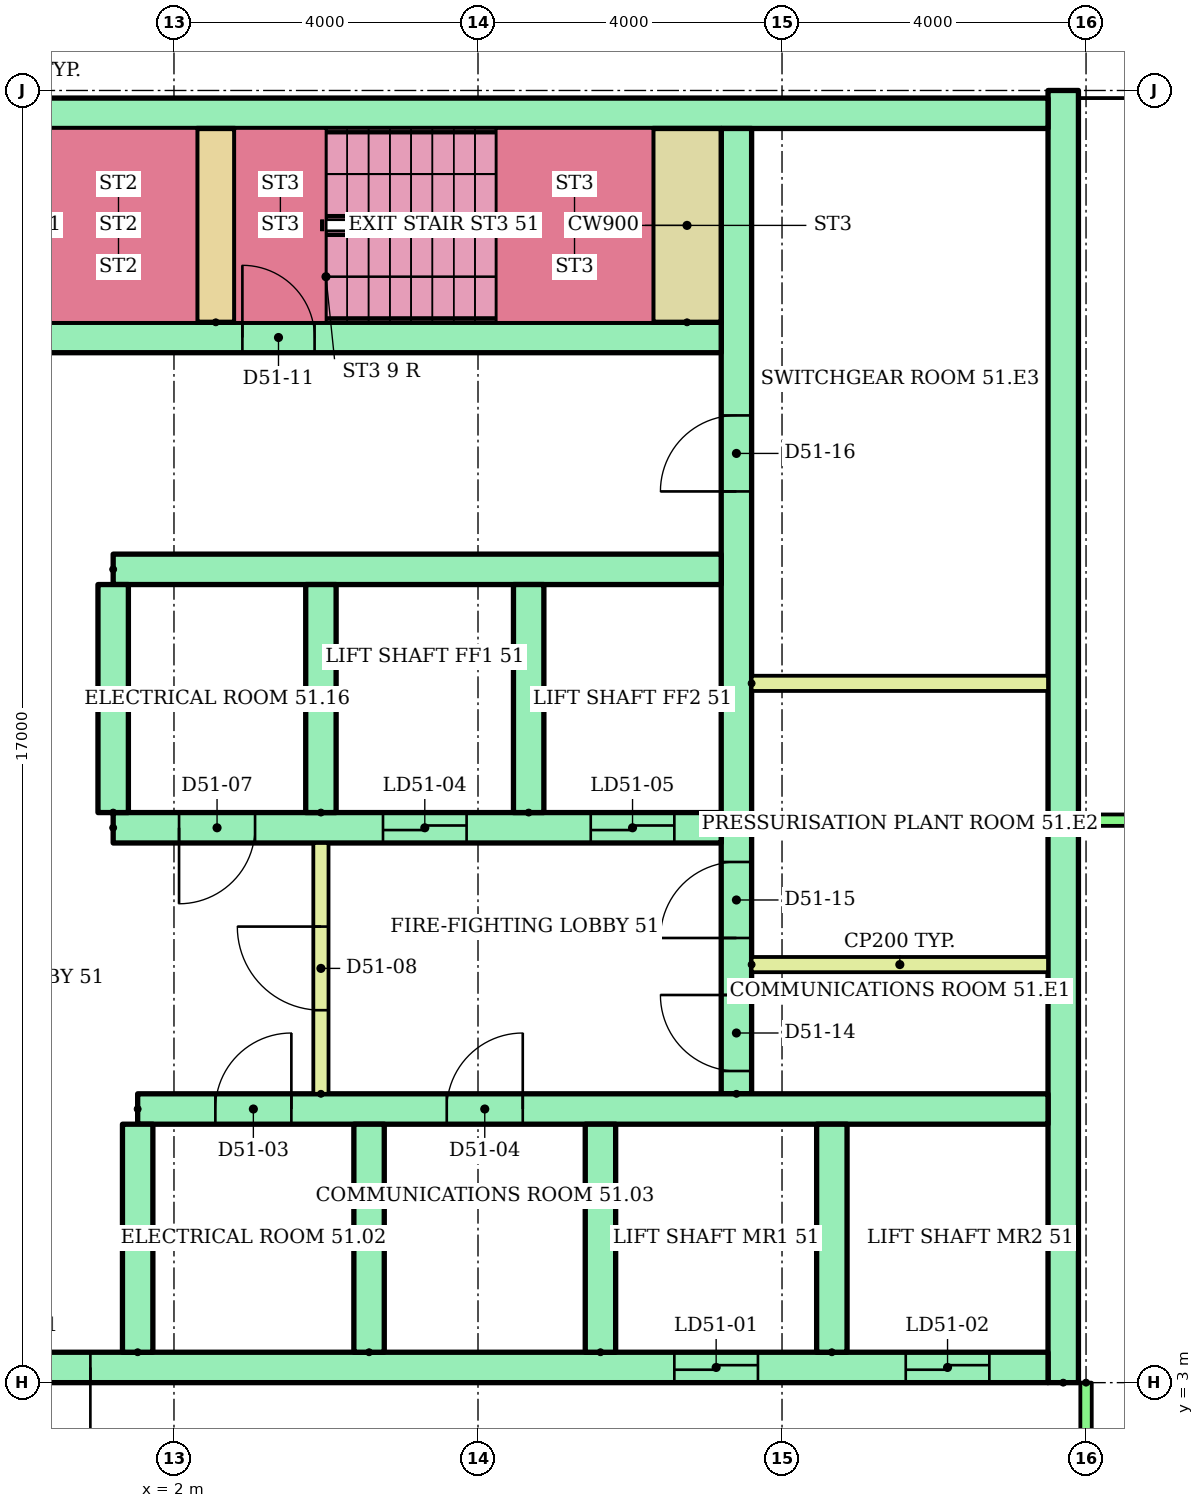
"""IFC4 building model, lengths in metres.
Left out: names, types, materials, properties, quantities, classifications, styles, units other than length and angle.
Written with IfcOpenShell. Run it as: python <this file> out.ifc"""

import sys

from ifc_helpers import new_model, si_unit, direction, frame, frame_2d, origin, place, context, subcontext, project, spatial, rectangle, extrude, element, fill, save


model = new_model("IFC4")
c1 = context("Model", 3, precision=1e-05, world=origin(), true_north=direction((0.0, 1.0)))
c2 = subcontext(c1, "Body", "Model", "MODEL_VIEW")
j1 = project(units=[si_unit("LENGTHUNIT", "METRE"), si_unit("PLANEANGLEUNIT", "RADIAN")], contexts=[c1])
p1 = place(None, origin())
s1 = spatial("IfcSite", under=j1, at=p1, CompositionType="ELEMENT")
p2 = place(p1, origin())
s2 = spatial("IfcBuilding", under=s1, at=p2, CompositionType="ELEMENT")
p3 = place(p2, frame((0.0, 0.0, 194.1)))
s3 = spatial("IfcBuildingStorey", under=s2, at=p3, CompositionType="ELEMENT", Elevation=194.1)
p4 = place(p3, frame((13.7, 3.0, 0.0), z_axis=(0.0, 0.0, 1.0), x_axis=(0.0, 1.0, 0.0)))
e1 = element("IfcWall", 1, at=p4, inside=s3, PredefinedType="SHEAR", context=c2, shape_type="SweptSolid", body=[
    extrude(rectangle(XDim=17.0, YDim=0.4, at=frame_2d((8.5, 0.0))), origin(), (0.0, 0.0, 1.0), 8.8),
])
p5 = place(p3, frame((-13.5, 19.7, 0.0)))
e2 = element("IfcWall", 2, at=p5, inside=s3, PredefinedType="SHEAR", context=c2, shape_type="SweptSolid", body=[
    extrude(rectangle(XDim=27.0, YDim=0.4, at=frame_2d((13.5, 0.0))), origin(), (0.0, 0.0, 1.0), 8.8),
])
p6 = place(p3, frame((9.4, 6.8, 0.0), z_axis=(0.0, 0.0, 1.0), x_axis=(0.0, 1.0, 0.0)))
e3 = element("IfcWall", 3, at=p6, inside=s3, PredefinedType="SHEAR", context=c2, shape_type="SweptSolid", body=[
    extrude(rectangle(XDim=12.7, YDim=0.4, at=frame_2d((6.35, 0.0))), origin(), (0.0, 0.0, 1.0), 8.8),
])
p7 = place(p6, frame((0.3, 0.0, 0.0)))
e4 = element("IfcOpeningElement", 4, at=p7, cuts=e3, PredefinedType="OPENING", context=c2, shape_type="SweptSolid", body=[
    extrude(rectangle(XDim=1.0, YDim=2.1, at=frame_2d((0.5, 1.05))), frame((0.0, 0.21, 0.0), z_axis=(0.0, -1.0, 0.0), x_axis=(1.0, 0.0, 0.0)), (0.0, 0.0, 1.0), 0.42),
])
p8 = place(p6, frame((2.05, 0.0, 0.0)))
e5 = element("IfcOpeningElement", 5, at=p8, cuts=e3, PredefinedType="OPENING", context=c2, shape_type="SweptSolid", body=[
    extrude(rectangle(XDim=1.0, YDim=2.1, at=frame_2d((0.5, 1.05))), frame((0.0, 0.21, 0.0), z_axis=(0.0, -1.0, 0.0), x_axis=(1.0, 0.0, 0.0)), (0.0, 0.0, 1.0), 0.42),
])
p9 = place(p6, frame((7.925, 0.0, 0.0)))
e6 = element("IfcOpeningElement", 6, at=p9, cuts=e3, PredefinedType="OPENING", context=c2, shape_type="SweptSolid", body=[
    extrude(rectangle(XDim=1.0, YDim=2.1, at=frame_2d((0.5, 1.05))), frame((0.0, 0.21, 0.0), z_axis=(0.0, -1.0, 0.0), x_axis=(1.0, 0.0, 0.0)), (0.0, 0.0, 1.0), 0.42),
])
p10 = place(p3, frame((-13.5, 3.2, 0.0)))
e7 = element("IfcWall", 7, at=p10, inside=s3, PredefinedType="SHEAR", context=c2, shape_type="SweptSolid", body=[
    extrude(rectangle(XDim=27.0, YDim=0.4, at=frame_2d((13.5, 0.0))), origin(), (0.0, 0.0, 1.0), 8.8),
])
p11 = place(p10, frame((22.083, 0.0, 0.0)))
e8 = element("IfcOpeningElement", 8, at=p11, cuts=e7, PredefinedType="OPENING", context=c2, shape_type="SweptSolid", body=[
    extrude(rectangle(XDim=1.1, YDim=2.1, at=frame_2d((0.55, 1.05))), frame((0.0, 0.21, 0.0), z_axis=(0.0, -1.0, 0.0), x_axis=(1.0, 0.0, 0.0)), (0.0, 0.0, 1.0), 0.42),
])
p12 = place(p10, frame((25.128, 0.0, 0.0)))
e9 = element("IfcOpeningElement", 9, at=p12, cuts=e7, PredefinedType="OPENING", context=c2, shape_type="SweptSolid", body=[
    extrude(rectangle(XDim=1.1, YDim=2.1, at=frame_2d((0.55, 1.05))), frame((0.0, 0.21, 0.0), z_axis=(0.0, -1.0, 0.0), x_axis=(1.0, 0.0, 0.0)), (0.0, 0.0, 1.0), 0.42),
])
p13 = place(p10, frame((12.6, 0.0, 0.0)))
e10 = element("IfcOpeningElement", 10, at=p13, cuts=e7, PredefinedType="OPENING", context=c2, shape_type="SweptSolid", body=[
    extrude(rectangle(XDim=1.8, YDim=2.1, at=frame_2d((0.9, 1.05))), frame((0.0, 0.21, 0.0), z_axis=(0.0, -1.0, 0.0), x_axis=(1.0, 0.0, 0.0)), (0.0, 0.0, 1.0), 0.42),
])
p14 = place(p3, frame((1.522, 6.6, 0.0)))
e11 = element("IfcWall", 11, at=p14, inside=s3, PredefinedType="SHEAR", context=c2, shape_type="SweptSolid", body=[
    extrude(rectangle(XDim=11.978, YDim=0.4, at=frame_2d((5.989, 0.0))), origin(), (0.0, 0.0, 1.0), 8.8),
])
p15 = place(p14, frame((1.022, 0.0, 0.0)))
e12 = element("IfcOpeningElement", 12, at=p15, cuts=e11, PredefinedType="OPENING", context=c2, shape_type="SweptSolid", body=[
    extrude(rectangle(XDim=1.0, YDim=2.1, at=frame_2d((0.5, 1.05))), frame((0.0, 0.21, 0.0), z_axis=(0.0, -1.0, 0.0), x_axis=(1.0, 0.0, 0.0)), (0.0, 0.0, 1.0), 0.42),
])
p16 = place(p14, frame((4.067, 0.0, 0.0)))
e13 = element("IfcOpeningElement", 13, at=p16, cuts=e11, PredefinedType="OPENING", context=c2, shape_type="SweptSolid", body=[
    extrude(rectangle(XDim=1.0, YDim=2.1, at=frame_2d((0.5, 1.05))), frame((0.0, 0.21, 0.0), z_axis=(0.0, -1.0, 0.0), x_axis=(1.0, 0.0, 0.0)), (0.0, 0.0, 1.0), 0.42),
])
for number, where, z_axis, x_axis in (
    (14, (1.522, 3.4, 0.0), (0.0, 0.0, 1.0), (0.0, 1.0, 0.0)),
    (15, (4.567, 3.4, 0.0), (0.0, 0.0, 1.0), (0.0, 1.0, 0.0)),
    (16, (7.611, 3.4, 0.0), (0.0, 0.0, 1.0), (0.0, 1.0, 0.0)),
    (17, (10.656, 3.4, 0.0), (0.0, 0.0, 1.0), (0.0, 1.0, 0.0)),
):
    element("IfcWall", number, at=place(p3, frame(where, z_axis=z_axis, x_axis=x_axis)), inside=s3, PredefinedType="SHEAR", context=c2, shape_type="SweptSolid", body=[
        extrude(rectangle(XDim=3.0, YDim=0.4, at=frame_2d((1.5, 0.0))), origin(), (0.0, 0.0, 1.0), 8.8),
    ])
p17 = place(p3, frame((1.2, 10.3, 0.0)))
e18 = element("IfcWall", 18, at=p17, inside=s3, PredefinedType="SHEAR", context=c2, shape_type="SweptSolid", body=[
    extrude(rectangle(XDim=8.0, YDim=0.4, at=frame_2d((4.0, 0.0))), origin(), (0.0, 0.0, 1.0), 8.8),
])
p18 = place(p17, frame((3.55, 0.0, 0.0)))
e19 = element("IfcOpeningElement", 19, at=p18, cuts=e18, PredefinedType="OPENING", context=c2, shape_type="SweptSolid", body=[
    extrude(rectangle(XDim=1.1, YDim=2.1, at=frame_2d((0.55, 1.05))), frame((0.0, 0.21, 0.0), z_axis=(0.0, -1.0, 0.0), x_axis=(1.0, 0.0, 0.0)), (0.0, 0.0, 1.0), 0.42),
])
p19 = place(p17, frame((6.283, 0.0, 0.0)))
e20 = element("IfcOpeningElement", 20, at=p19, cuts=e18, PredefinedType="OPENING", context=c2, shape_type="SweptSolid", body=[
    extrude(rectangle(XDim=1.1, YDim=2.1, at=frame_2d((0.55, 1.05))), frame((0.0, 0.21, 0.0), z_axis=(0.0, -1.0, 0.0), x_axis=(1.0, 0.0, 0.0)), (0.0, 0.0, 1.0), 0.42),
])
p20 = place(p17, frame((0.867, 0.0, 0.0)))
e21 = element("IfcOpeningElement", 21, at=p20, cuts=e18, PredefinedType="OPENING", context=c2, shape_type="SweptSolid", body=[
    extrude(rectangle(XDim=1.0, YDim=2.1, at=frame_2d((0.5, 1.05))), frame((0.0, 0.21, 0.0), z_axis=(0.0, -1.0, 0.0), x_axis=(1.0, 0.0, 0.0)), (0.0, 0.0, 1.0), 0.42),
])
p21 = place(p3, frame((1.2, 13.7, 0.0)))
e22 = element("IfcWall", 22, at=p21, inside=s3, PredefinedType="SHEAR", context=c2, shape_type="SweptSolid", body=[
    extrude(rectangle(XDim=8.0, YDim=0.4, at=frame_2d((4.0, 0.0))), origin(), (0.0, 0.0, 1.0), 8.8),
])
for number, where, z_axis, x_axis in (
    (23, (1.2, 10.5, 0.0), (0.0, 0.0, 1.0), (0.0, 1.0, 0.0)),
    (24, (3.933, 10.5, 0.0), (0.0, 0.0, 1.0), (0.0, 1.0, 0.0)),
    (25, (6.667, 10.5, 0.0), (0.0, 0.0, 1.0), (0.0, 1.0, 0.0)),
):
    element("IfcWall", number, at=place(p3, frame(where, z_axis=z_axis, x_axis=x_axis)), inside=s3, PredefinedType="SHEAR", context=c2, shape_type="SweptSolid", body=[
        extrude(rectangle(XDim=3.0, YDim=0.4, at=frame_2d((1.5, 0.0))), origin(), (0.0, 0.0, 1.0), 8.8),
    ])
p22 = place(p3, frame((3.933, 6.8, 0.0), z_axis=(0.0, 0.0, 1.0), x_axis=(0.0, 1.0, 0.0)))
e26 = element("IfcWall", 26, at=p22, inside=s3, PredefinedType="PARTITIONING", context=c2, shape_type="SweptSolid", body=[
    extrude(rectangle(XDim=3.3, YDim=0.2, at=frame_2d((1.65, 0.0))), origin(), (0.0, 0.0, 1.0), 8.8),
])
p23 = place(p22, frame((1.1, 0.0, 0.0)))
e27 = element("IfcOpeningElement", 27, at=p23, cuts=e26, PredefinedType="OPENING", context=c2, shape_type="SweptSolid", body=[
    extrude(rectangle(XDim=1.1, YDim=2.1, at=frame_2d((0.55, 1.05))), frame((0.0, 0.11, 0.0), z_axis=(0.0, -1.0, 0.0), x_axis=(1.0, 0.0, 0.0)), (0.0, 0.0, 1.0), 0.22),
])
p24 = place(p3, frame((-9.2, 16.75, 0.0)))
e28 = element("IfcWall", 28, at=p24, inside=s3, PredefinedType="SHEAR", context=c2, shape_type="SweptSolid", body=[
    extrude(rectangle(XDim=18.4, YDim=0.4, at=frame_2d((9.2, 0.0))), origin(), (0.0, 0.0, 1.0), 8.8),
])
p25 = place(p24, frame((0.1, 0.0, 0.0)))
e29 = element("IfcOpeningElement", 29, at=p25, cuts=e28, PredefinedType="OPENING", context=c2, shape_type="SweptSolid", body=[
    extrude(rectangle(XDim=0.95, YDim=2.1, at=frame_2d((0.475, 1.05))), frame((0.0, 0.21, 0.0), z_axis=(0.0, -1.0, 0.0), x_axis=(1.0, 0.0, 0.0)), (0.0, 0.0, 1.0), 0.42),
])
p26 = place(p24, frame((6.1, 0.0, 0.0)))
e30 = element("IfcOpeningElement", 30, at=p26, cuts=e28, PredefinedType="OPENING", context=c2, shape_type="SweptSolid", body=[
    extrude(rectangle(XDim=0.95, YDim=2.1, at=frame_2d((0.475, 1.05))), frame((0.0, 0.21, 0.0), z_axis=(0.0, -1.0, 0.0), x_axis=(1.0, 0.0, 0.0)), (0.0, 0.0, 1.0), 0.42),
])
p27 = place(p24, frame((12.1, 0.0, 0.0)))
e31 = element("IfcOpeningElement", 31, at=p27, cuts=e28, PredefinedType="OPENING", context=c2, shape_type="SweptSolid", body=[
    extrude(rectangle(XDim=0.95, YDim=2.1, at=frame_2d((0.475, 1.05))), frame((0.0, 0.21, 0.0), z_axis=(0.0, -1.0, 0.0), x_axis=(1.0, 0.0, 0.0)), (0.0, 0.0, 1.0), 0.42),
])
p28 = place(p3, frame((2.55, 16.95, 0.0), z_axis=(0.0, 0.0, 1.0), x_axis=(0.0, 1.0, 0.0)))
e32 = element("IfcWall", 32, at=p28, inside=s3, PredefinedType="SHEAR", context=c2, shape_type="SweptSolid", body=[
    extrude(rectangle(XDim=2.55, YDim=0.5, at=frame_2d((1.275, 0.0))), origin(), (0.0, 0.0, 1.0), 8.8),
])
p29 = place(p3, frame((8.75, 16.95, 0.0), z_axis=(0.0, 0.0, 1.0), x_axis=(0.0, 1.0, 0.0)))
e33 = element("IfcWall", 33, at=p29, inside=s3, PredefinedType="SHEAR", context=c2, shape_type="SweptSolid", body=[
    extrude(rectangle(XDim=2.55, YDim=0.9, at=frame_2d((1.275, 0.0))), origin(), (0.0, 0.0, 1.0), 8.8),
])
for number, where in (
    (34, (9.6, 8.5, 0.0)),
    (35, (9.6, 12.2, 0.0)),
):
    element("IfcWall", number, at=place(p3, frame(where)), inside=s3, PredefinedType="PARTITIONING", context=c2, shape_type="SweptSolid", body=[
        extrude(rectangle(XDim=3.9, YDim=0.2, at=frame_2d((1.95, 0.0))), origin(), (0.0, 0.0, 1.0), 8.8),
    ])
p30 = place(p3, frame((22.0, 10.4, 0.0), z_axis=(0.0, 0.0, 1.0), x_axis=(-1.0, 0.0, 0.0)))
e36 = element("IfcWall", 36, at=p30, inside=s3, PredefinedType="PARTITIONING", context=c2, shape_type="SweptSolid", body=[
    extrude(rectangle(XDim=8.0, YDim=0.15, at=frame_2d((4.0, 0.0))), origin(), (0.0, 0.0, 1.0), 8.8),
])
p31 = place(p3, frame((14.0, 3.0, 0.0), z_axis=(0.0, 0.0, 1.0), x_axis=(0.0, -1.0, 0.0)))
e37 = element("IfcWall", 37, at=p31, inside=s3, PredefinedType="PARTITIONING", context=c2, shape_type="SweptSolid", body=[
    extrude(rectangle(XDim=1.6, YDim=0.15, at=frame_2d((0.8, 0.0))), origin(), (0.0, 0.0, 1.0), 8.8),
])
p32 = place(p11, origin())
e38 = element("IfcDoor", 38, at=p32, inside=s3, OperationType="SLIDING_TO_LEFT", PredefinedType="DOOR", context=c2, shape_type="SweptSolid", body=[
    extrude(rectangle(XDim=1.1, YDim=2.1, at=frame_2d((0.55, 1.05))), frame((0.0, 0.025, 0.0), z_axis=(0.0, -1.0, 0.0), x_axis=(1.0, 0.0, 0.0)), (0.0, 0.0, 1.0), 0.05),
])
fill(e8, e38)
p33 = place(p12, origin())
e39 = element("IfcDoor", 39, at=p33, inside=s3, OperationType="SLIDING_TO_LEFT", PredefinedType="DOOR", context=c2, shape_type="SweptSolid", body=[
    extrude(rectangle(XDim=1.1, YDim=2.1, at=frame_2d((0.55, 1.05))), frame((0.0, 0.025, 0.0), z_axis=(0.0, -1.0, 0.0), x_axis=(1.0, 0.0, 0.0)), (0.0, 0.0, 1.0), 0.05),
])
fill(e9, e39)
p34 = place(p13, frame((1.8, 0.0, 0.0), z_axis=(0.0, 0.0, 1.0), x_axis=(-1.0, 0.0, 0.0)))
e40 = element("IfcDoor", 40, at=p34, inside=s3, OperationType="DOUBLE_DOOR_SINGLE_SWING", PredefinedType="DOOR", context=c2, shape_type="SweptSolid", body=[
    extrude(rectangle(XDim=1.8, YDim=2.1, at=frame_2d((0.9, 1.05))), frame((0.0, 0.025, 0.0), z_axis=(0.0, -1.0, 0.0), x_axis=(1.0, 0.0, 0.0)), (0.0, 0.0, 1.0), 0.05),
])
fill(e10, e40)
p35 = place(p15, origin())
e41 = element("IfcDoor", 41, at=p35, inside=s3, OperationType="SINGLE_SWING_RIGHT", PredefinedType="DOOR", context=c2, shape_type="SweptSolid", body=[
    extrude(rectangle(XDim=1.0, YDim=2.1, at=frame_2d((0.5, 1.05))), frame((0.0, 0.025, 0.0), z_axis=(0.0, -1.0, 0.0), x_axis=(1.0, 0.0, 0.0)), (0.0, 0.0, 1.0), 0.05),
])
fill(e12, e41)
p36 = place(p16, origin())
e42 = element("IfcDoor", 42, at=p36, inside=s3, OperationType="SINGLE_SWING_RIGHT", PredefinedType="DOOR", context=c2, shape_type="SweptSolid", body=[
    extrude(rectangle(XDim=1.0, YDim=2.1, at=frame_2d((0.5, 1.05))), frame((0.0, 0.025, 0.0), z_axis=(0.0, -1.0, 0.0), x_axis=(1.0, 0.0, 0.0)), (0.0, 0.0, 1.0), 0.05),
])
fill(e13, e42)
p37 = place(p18, origin())
e43 = element("IfcDoor", 43, at=p37, inside=s3, OperationType="SLIDING_TO_LEFT", PredefinedType="DOOR", context=c2, shape_type="SweptSolid", body=[
    extrude(rectangle(XDim=1.1, YDim=2.1, at=frame_2d((0.55, 1.05))), frame((0.0, 0.025, 0.0), z_axis=(0.0, -1.0, 0.0), x_axis=(1.0, 0.0, 0.0)), (0.0, 0.0, 1.0), 0.05),
])
fill(e19, e43)
p38 = place(p19, origin())
e44 = element("IfcDoor", 44, at=p38, inside=s3, OperationType="SLIDING_TO_LEFT", PredefinedType="DOOR", context=c2, shape_type="SweptSolid", body=[
    extrude(rectangle(XDim=1.1, YDim=2.1, at=frame_2d((0.55, 1.05))), frame((0.0, 0.025, 0.0), z_axis=(0.0, -1.0, 0.0), x_axis=(1.0, 0.0, 0.0)), (0.0, 0.0, 1.0), 0.05),
])
fill(e20, e44)
p39 = place(p20, frame((1.0, 0.0, 0.0), z_axis=(0.0, 0.0, 1.0), x_axis=(-1.0, 0.0, 0.0)))
e45 = element("IfcDoor", 45, at=p39, inside=s3, OperationType="SINGLE_SWING_LEFT", PredefinedType="DOOR", context=c2, shape_type="SweptSolid", body=[
    extrude(rectangle(XDim=1.0, YDim=2.1, at=frame_2d((0.5, 1.05))), frame((0.0, 0.025, 0.0), z_axis=(0.0, -1.0, 0.0), x_axis=(1.0, 0.0, 0.0)), (0.0, 0.0, 1.0), 0.05),
])
fill(e21, e45)
p40 = place(p23, origin())
e46 = element("IfcDoor", 46, at=p40, inside=s3, OperationType="SINGLE_SWING_RIGHT", PredefinedType="DOOR", context=c2, shape_type="SweptSolid", body=[
    extrude(rectangle(XDim=1.1, YDim=2.1, at=frame_2d((0.55, 1.05))), frame((0.0, 0.025, 0.0), z_axis=(0.0, -1.0, 0.0), x_axis=(1.0, 0.0, 0.0)), (0.0, 0.0, 1.0), 0.05),
])
fill(e27, e46)
p41 = place(p27, origin())
e47 = element("IfcDoor", 47, at=p41, inside=s3, OperationType="SINGLE_SWING_LEFT", PredefinedType="DOOR", context=c2, shape_type="SweptSolid", body=[
    extrude(rectangle(XDim=0.95, YDim=2.1, at=frame_2d((0.475, 1.05))), frame((0.0, 0.025, 0.0), z_axis=(0.0, -1.0, 0.0), x_axis=(1.0, 0.0, 0.0)), (0.0, 0.0, 1.0), 0.05),
])
fill(e31, e47)
p42 = place(p7, origin())
e48 = element("IfcDoor", 48, at=p42, inside=s3, OperationType="SINGLE_SWING_RIGHT", PredefinedType="DOOR", context=c2, shape_type="SweptSolid", body=[
    extrude(rectangle(XDim=1.0, YDim=2.1, at=frame_2d((0.5, 1.05))), frame((0.0, 0.025, 0.0), z_axis=(0.0, -1.0, 0.0), x_axis=(1.0, 0.0, 0.0)), (0.0, 0.0, 1.0), 0.05),
])
fill(e4, e48)
p43 = place(p8, origin())
e49 = element("IfcDoor", 49, at=p43, inside=s3, OperationType="SINGLE_SWING_LEFT", PredefinedType="DOOR", context=c2, shape_type="SweptSolid", body=[
    extrude(rectangle(XDim=1.0, YDim=2.1, at=frame_2d((0.5, 1.05))), frame((0.0, 0.025, 0.0), z_axis=(0.0, -1.0, 0.0), x_axis=(1.0, 0.0, 0.0)), (0.0, 0.0, 1.0), 0.05),
])
fill(e5, e49)
p44 = place(p9, origin())
e50 = element("IfcDoor", 50, at=p44, inside=s3, OperationType="SINGLE_SWING_LEFT", PredefinedType="DOOR", context=c2, shape_type="SweptSolid", body=[
    extrude(rectangle(XDim=1.0, YDim=2.1, at=frame_2d((0.5, 1.05))), frame((0.0, 0.025, 0.0), z_axis=(0.0, -1.0, 0.0), x_axis=(1.0, 0.0, 0.0)), (0.0, 0.0, 1.0), 0.05),
])
fill(e6, e50)
save(model, sys.argv[1])
